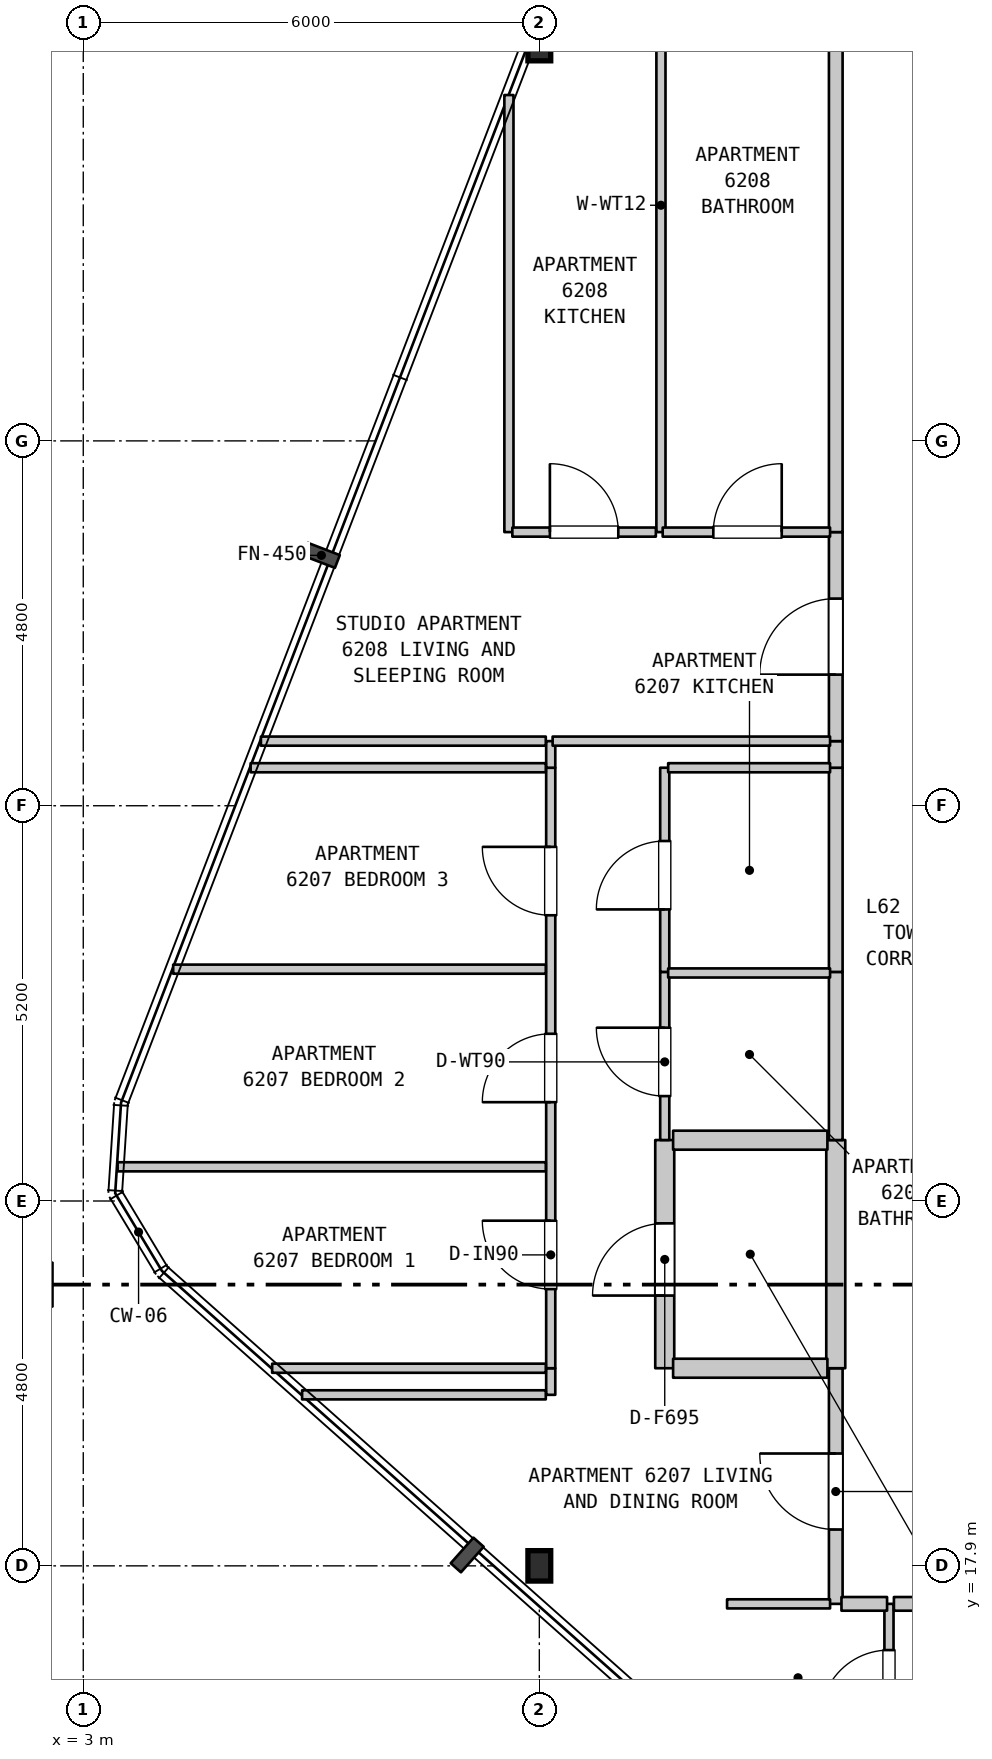
"""IFC4 building model, lengths in metres.
Left out: names, types, materials, properties, quantities, classifications, styles, units other than length and angle.
Written with IfcOpenShell. Run it as: python <this file> out.ifc"""

import sys

from ifc_helpers import new_model, si_unit, direction, frame, frame_2d, origin, origin_2d, place, context, subcontext, project, spatial, rectangle, i_section, extrude, element, fill, save


model = new_model("IFC4")
c1 = context("Model", 3, precision=1e-05, world=origin(), true_north=direction((0.0, 1.0)))
c2 = subcontext(c1, "Body", "Model", "MODEL_VIEW")
j1 = project(units=[si_unit("LENGTHUNIT", "METRE"), si_unit("PLANEANGLEUNIT", "RADIAN")], contexts=[c1])
p1 = place(None, origin())
s1 = spatial("IfcSite", under=j1, at=p1, CompositionType="ELEMENT")
p2 = place(p1, origin())
s2 = spatial("IfcBuilding", under=s1, at=p2, CompositionType="ELEMENT")
p3 = place(p2, frame((0.0, 0.0, 251.0)))
s3 = spatial("IfcBuildingStorey", under=s2, at=p3, CompositionType="ELEMENT", Elevation=251.0)
for number, where, z_axis, x_axis in (
    (1, (9.0, 17.9, 0.0), (0.0, 0.0, 1.0), (1.0, 0.0, 0.0)),
    (2, (9.0, 37.9, 0.0), (0.0, 0.0, 1.0), (1.0, 0.0, 0.0)),
):
    element("IfcColumn", number, at=place(p3, frame(where, z_axis=z_axis, x_axis=x_axis)), inside=s3, PredefinedType="COLUMN", context=c2, shape_type="SweptSolid", body=[
        extrude(i_section(OverallWidth=0.3, OverallDepth=0.4, WebThickness=0.013, FlangeThickness=0.024, FilletRadius=0.027, at=origin_2d()), origin(), (0.0, 0.0, 1.0), 3.7),
    ])
p4 = place(p3, frame((8.6, 31.5, 0.0), z_axis=(0.0, 0.0, 1.0), x_axis=(0.0, 1.0, 0.0)))
e3 = element("IfcWall", 3, at=p4, inside=s3, PredefinedType="PARTITIONING", context=c2, shape_type="SweptSolid", body=[
    extrude(rectangle(XDim=5.75, YDim=0.12, at=frame_2d((2.875, 0.0))), origin(), (0.0, 0.0, 1.0), 3.39),
])
p5 = place(p3, frame((9.15, 20.15, 0.0), z_axis=(0.0, 0.0, 1.0), x_axis=(0.0, 1.0, 0.0)))
e4 = element("IfcWall", 4, at=p5, inside=s3, PredefinedType="PARTITIONING", context=c2, shape_type="SweptSolid", body=[
    extrude(rectangle(XDim=0.35, YDim=0.12, at=frame_2d((0.175, 0.0))), origin(), (0.0, 0.0, 1.0), 3.39),
])
p6 = place(p3, frame((9.15, 20.5, 0.0), z_axis=(0.0, 0.0, 1.0), x_axis=(0.0, 1.0, 0.0)))
e5 = element("IfcWall", 5, at=p6, inside=s3, PredefinedType="PARTITIONING", context=c2, shape_type="SweptSolid", body=[
    extrude(rectangle(XDim=7.9, YDim=0.12, at=frame_2d((3.95, 0.0))), origin(), (0.0, 0.0, 1.0), 2.79),
])
p7 = place(p6, frame((1.041, 0.0, 0.0)))
e6 = element("IfcOpeningElement", 6, at=p7, cuts=e5, PredefinedType="OPENING", context=c2, shape_type="SweptSolid", body=[
    extrude(rectangle(XDim=0.9, YDim=2.15, at=frame_2d((0.45, 1.075))), frame((0.0, 0.07, 0.0), z_axis=(0.0, -1.0, 0.0), x_axis=(1.0, 0.0, 0.0)), (0.0, 0.0, 1.0), 0.14),
])
p8 = place(p6, frame((3.5, 0.0, 0.0)))
e7 = element("IfcOpeningElement", 7, at=p8, cuts=e5, PredefinedType="OPENING", context=c2, shape_type="SweptSolid", body=[
    extrude(rectangle(XDim=0.9, YDim=2.15, at=frame_2d((0.45, 1.075))), frame((0.0, 0.07, 0.0), z_axis=(0.0, -1.0, 0.0), x_axis=(1.0, 0.0, 0.0)), (0.0, 0.0, 1.0), 0.14),
])
p9 = place(p6, frame((5.959, 0.0, 0.0)))
e8 = element("IfcOpeningElement", 8, at=p9, cuts=e5, PredefinedType="OPENING", context=c2, shape_type="SweptSolid", body=[
    extrude(rectangle(XDim=0.9, YDim=2.15, at=frame_2d((0.45, 1.075))), frame((0.0, 0.07, 0.0), z_axis=(0.0, -1.0, 0.0), x_axis=(1.0, 0.0, 0.0)), (0.0, 0.0, 1.0), 0.14),
])
p10 = place(p3, frame((9.15, 28.4, 0.0), z_axis=(0.0, 0.0, 1.0), x_axis=(0.0, 1.0, 0.0)))
e9 = element("IfcWall", 9, at=p10, inside=s3, PredefinedType="PARTITIONING", context=c2, shape_type="SweptSolid", body=[
    extrude(rectangle(XDim=0.35, YDim=0.12, at=frame_2d((0.175, 0.0))), origin(), (0.0, 0.0, 1.0), 3.39),
])
p11 = place(p3, frame((10.6, 31.5, 0.0), z_axis=(0.0, 0.0, 1.0), x_axis=(0.0, 1.0, 0.0)))
e10 = element("IfcWall", 10, at=p11, inside=s3, PredefinedType="PARTITIONING", context=c2, shape_type="SweptSolid", body=[
    extrude(rectangle(XDim=8.6, YDim=0.12, at=frame_2d((4.3, 0.0))), origin(), (0.0, 0.0, 1.0), 3.39),
])
p12 = place(p3, frame((10.65, 20.5, 0.0), z_axis=(0.0, 0.0, 1.0), x_axis=(0.0, 1.0, 0.0)))
e11 = element("IfcWall", 11, at=p12, inside=s3, PredefinedType="STANDARD", context=c2, shape_type="SweptSolid", body=[
    extrude(rectangle(XDim=3.002, YDim=0.25, at=frame_2d((1.501, 0.0))), origin(), (0.0, 0.0, 1.0), 3.39),
])
p13 = place(p12, frame((0.956, 0.0, 0.0)))
e12 = element("IfcOpeningElement", 12, at=p13, cuts=e11, PredefinedType="OPENING", context=c2, shape_type="SweptSolid", body=[
    extrude(rectangle(XDim=0.95, YDim=2.15, at=frame_2d((0.475, 1.075))), frame((0.0, 0.135, 0.0), z_axis=(0.0, -1.0, 0.0), x_axis=(1.0, 0.0, 0.0)), (0.0, 0.0, 1.0), 0.27),
])
p14 = place(p3, frame((10.65, 23.502, 0.0), z_axis=(0.0, 0.0, 1.0), x_axis=(0.0, 1.0, 0.0)))
e13 = element("IfcWall", 13, at=p14, inside=s3, PredefinedType="PARTITIONING", context=c2, shape_type="SweptSolid", body=[
    extrude(rectangle(XDim=2.212, YDim=0.12, at=frame_2d((1.106, 0.0))), origin(), (0.0, 0.0, 1.0), 3.39),
])
p15 = place(p14, frame((0.578, 0.0, 0.0)))
e14 = element("IfcOpeningElement", 14, at=p15, cuts=e13, PredefinedType="OPENING", context=c2, shape_type="SweptSolid", body=[
    extrude(rectangle(XDim=0.9, YDim=2.1, at=frame_2d((0.45, 1.05))), frame((0.0, 0.07, 0.0), z_axis=(0.0, -1.0, 0.0), x_axis=(1.0, 0.0, 0.0)), (0.0, 0.0, 1.0), 0.14),
])
p16 = place(p3, frame((10.65, 25.714, 0.0), z_axis=(0.0, 0.0, 1.0), x_axis=(0.0, 1.0, 0.0)))
e15 = element("IfcWall", 15, at=p16, inside=s3, PredefinedType="PARTITIONING", context=c2, shape_type="SweptSolid", body=[
    extrude(rectangle(XDim=2.686, YDim=0.12, at=frame_2d((1.343, 0.0))), origin(), (0.0, 0.0, 1.0), 3.39),
])
p17 = place(p16, frame((0.822, 0.0, 0.0)))
e16 = element("IfcOpeningElement", 16, at=p17, cuts=e15, PredefinedType="OPENING", context=c2, shape_type="SweptSolid", body=[
    extrude(rectangle(XDim=0.9, YDim=2.15, at=frame_2d((0.45, 1.075))), frame((0.0, 0.07, 0.0), z_axis=(0.0, -1.0, 0.0), x_axis=(1.0, 0.0, 0.0)), (0.0, 0.0, 1.0), 0.14),
])
p18 = place(p3, frame((12.9, 17.4, 0.0), z_axis=(0.0, 0.0, 1.0), x_axis=(0.0, 1.0, 0.0)))
e17 = element("IfcWall", 17, at=p18, inside=s3, PredefinedType="STANDARD", context=c2, shape_type="SweptSolid", body=[
    extrude(rectangle(XDim=3.1, YDim=0.18, at=frame_2d((1.55, 0.0))), origin(), (0.0, 0.0, 1.0), 3.39),
])
p19 = place(p18, frame((0.978, 0.0, 0.0)))
e18 = element("IfcOpeningElement", 18, at=p19, cuts=e17, PredefinedType="OPENING", context=c2, shape_type="SweptSolid", body=[
    extrude(rectangle(XDim=1.0, YDim=2.15, at=frame_2d((0.5, 1.075))), frame((0.0, 0.1, 0.0), z_axis=(0.0, -1.0, 0.0), x_axis=(1.0, 0.0, 0.0)), (0.0, 0.0, 1.0), 0.2),
])
p20 = place(p3, frame((12.9, 20.5, 0.0), z_axis=(0.0, 0.0, 1.0), x_axis=(0.0, 1.0, 0.0)))
e19 = element("IfcWall", 19, at=p20, inside=s3, PredefinedType="STANDARD", context=c2, shape_type="SweptSolid", body=[
    extrude(rectangle(XDim=3.002, YDim=0.25, at=frame_2d((1.501, 0.0))), origin(), (0.0, 0.0, 1.0), 3.39),
])
p21 = place(p3, frame((12.9, 23.502, 0.0), z_axis=(0.0, 0.0, 1.0), x_axis=(0.0, 1.0, 0.0)))
e20 = element("IfcWall", 20, at=p21, inside=s3, PredefinedType="STANDARD", context=c2, shape_type="SweptSolid", body=[
    extrude(rectangle(XDim=2.212, YDim=0.18, at=frame_2d((1.106, 0.0))), origin(), (0.0, 0.0, 1.0), 3.39),
])
p22 = place(p3, frame((12.9, 25.714, 0.0), z_axis=(0.0, 0.0, 1.0), x_axis=(0.0, 1.0, 0.0)))
e21 = element("IfcWall", 21, at=p22, inside=s3, PredefinedType="STANDARD", context=c2, shape_type="SweptSolid", body=[
    extrude(rectangle(XDim=2.686, YDim=0.18, at=frame_2d((1.343, 0.0))), origin(), (0.0, 0.0, 1.0), 3.39),
])
p23 = place(p3, frame((12.9, 28.4, 0.0), z_axis=(0.0, 0.0, 1.0), x_axis=(0.0, 1.0, 0.0)))
e22 = element("IfcWall", 22, at=p23, inside=s3, PredefinedType="STANDARD", context=c2, shape_type="SweptSolid", body=[
    extrude(rectangle(XDim=0.35, YDim=0.18, at=frame_2d((0.175, 0.0))), origin(), (0.0, 0.0, 1.0), 3.39),
])
p24 = place(p3, frame((12.9, 28.75, 0.0), z_axis=(0.0, 0.0, 1.0), x_axis=(0.0, 1.0, 0.0)))
e23 = element("IfcWall", 23, at=p24, inside=s3, PredefinedType="STANDARD", context=c2, shape_type="SweptSolid", body=[
    extrude(rectangle(XDim=2.75, YDim=0.18, at=frame_2d((1.375, 0.0))), origin(), (0.0, 0.0, 1.0), 3.39),
])
p25 = place(p24, frame((0.875, 0.0, 0.0)))
e24 = element("IfcOpeningElement", 24, at=p25, cuts=e23, PredefinedType="OPENING", context=c2, shape_type="SweptSolid", body=[
    extrude(rectangle(XDim=1.0, YDim=2.15, at=frame_2d((0.5, 1.075))), frame((0.0, 0.1, 0.0), z_axis=(0.0, -1.0, 0.0), x_axis=(1.0, 0.0, 0.0)), (0.0, 0.0, 1.0), 0.2),
])
p26 = place(p3, frame((12.9, 31.5, 0.0), z_axis=(0.0, 0.0, 1.0), x_axis=(0.0, 1.0, 0.0)))
e25 = element("IfcWall", 25, at=p26, inside=s3, PredefinedType="STANDARD", context=c2, shape_type="SweptSolid", body=[
    extrude(rectangle(XDim=8.6, YDim=0.18, at=frame_2d((4.3, 0.0))), origin(), (0.0, 0.0, 1.0), 3.39),
])
p27 = place(p3, frame((13.6, 15.45, 0.0), z_axis=(0.0, 0.0, 1.0), x_axis=(0.0, 1.0, 0.0)))
e26 = element("IfcWall", 26, at=p27, inside=s3, PredefinedType="PARTITIONING", context=c2, shape_type="SweptSolid", body=[
    extrude(rectangle(XDim=1.95, YDim=0.12, at=frame_2d((0.975, 0.0))), origin(), (0.0, 0.0, 1.0), 3.39),
])
p28 = place(p27, frame((0.442, 0.0, 0.0)))
e27 = element("IfcOpeningElement", 27, at=p28, cuts=e26, PredefinedType="OPENING", context=c2, shape_type="SweptSolid", body=[
    extrude(rectangle(XDim=0.9, YDim=2.15, at=frame_2d((0.45, 1.075))), frame((0.0, 0.07, 0.0), z_axis=(0.0, -1.0, 0.0), x_axis=(1.0, 0.0, 0.0)), (0.0, 0.0, 1.0), 0.14),
])
p29 = place(p3, frame((11.47, 17.4, 0.0), z_axis=(0.0, 0.0, 1.0), x_axis=(1.0, 0.0, 0.0)))
e28 = element("IfcWall", 28, at=p29, inside=s3, PredefinedType="PARTITIONING", context=c2, shape_type="SweptSolid", body=[
    extrude(rectangle(XDim=1.355, YDim=0.12, at=frame_2d((0.677, 0.0))), origin(), (0.0, 0.0, 1.0), 3.39),
])
p30 = place(p3, frame((12.975, 17.4, 0.0), z_axis=(0.0, 0.0, 1.0), x_axis=(1.0, 0.0, 0.0)))
e29 = element("IfcWall", 29, at=p30, inside=s3, PredefinedType="STANDARD", context=c2, shape_type="SweptSolid", body=[
    extrude(rectangle(XDim=0.6, YDim=0.18, at=frame_2d((0.3, 0.0))), origin(), (0.0, 0.0, 1.0), 3.39),
])
p31 = place(p3, frame((13.665, 17.4, 0.0), z_axis=(0.0, 0.0, 1.0), x_axis=(1.0, 0.0, 0.0)))
e30 = element("IfcWall", 30, at=p31, inside=s3, PredefinedType="STANDARD", context=c2, shape_type="SweptSolid", body=[
    extrude(rectangle(XDim=3.69, YDim=0.18, at=frame_2d((1.845, 0.0))), origin(), (0.0, 0.0, 1.0), 3.39),
])
p32 = place(p31, frame((2.01, 0.0, 0.0)))
e31 = element("IfcOpeningElement", 31, at=p32, cuts=e30, PredefinedType="OPENING", context=c2, shape_type="SweptSolid", body=[
    extrude(rectangle(XDim=1.0, YDim=2.15, at=frame_2d((0.5, 1.075))), frame((0.0, 0.1, 0.0), z_axis=(0.0, -1.0, 0.0), x_axis=(1.0, 0.0, 0.0)), (0.0, 0.0, 1.0), 0.2),
])
p33 = place(p3, frame((5.879, 20.15, 0.0), z_axis=(0.0, 0.0, 1.0), x_axis=(1.0, 0.0, 0.0)))
e32 = element("IfcWall", 32, at=p33, inside=s3, PredefinedType="PARTITIONING", context=c2, shape_type="SweptSolid", body=[
    extrude(rectangle(XDim=3.206, YDim=0.12, at=frame_2d((1.603, 0.0))), origin(), (0.0, 0.0, 1.0), 3.39),
])
p34 = place(p3, frame((5.485, 20.5, 0.0), z_axis=(0.0, 0.0, 1.0), x_axis=(1.0, 0.0, 0.0)))
e33 = element("IfcWall", 33, at=p34, inside=s3, PredefinedType="PARTITIONING", context=c2, shape_type="SweptSolid", body=[
    extrude(rectangle(XDim=3.6, YDim=0.12, at=frame_2d((1.8, 0.0))), origin(), (0.0, 0.0, 1.0), 3.39),
])
p35 = place(p3, frame((10.76, 20.5, 0.0), z_axis=(0.0, 0.0, 1.0), x_axis=(1.0, 0.0, 0.0)))
e34 = element("IfcWall", 34, at=p35, inside=s3, PredefinedType="STANDARD", context=c2, shape_type="SweptSolid", body=[
    extrude(rectangle(XDim=2.03, YDim=0.25, at=frame_2d((1.015, 0.0))), origin(), (0.0, 0.0, 1.0), 3.39),
])
p36 = place(p3, frame((3.452, 23.15, 0.0), z_axis=(0.0, 0.0, 1.0), x_axis=(1.0, 0.0, 0.0)))
e35 = element("IfcWall", 35, at=p36, inside=s3, PredefinedType="PARTITIONING", context=c2, shape_type="SweptSolid", body=[
    extrude(rectangle(XDim=5.633, YDim=0.12, at=frame_2d((2.816, 0.0))), origin(), (0.0, 0.0, 1.0), 3.39),
])
p37 = place(p3, frame((10.76, 23.5, 0.0), z_axis=(0.0, 0.0, 1.0), x_axis=(1.0, 0.0, 0.0)))
e36 = element("IfcWall", 36, at=p37, inside=s3, PredefinedType="STANDARD", context=c2, shape_type="SweptSolid", body=[
    extrude(rectangle(XDim=2.03, YDim=0.25, at=frame_2d((1.015, 0.0))), origin(), (0.0, 0.0, 1.0), 3.39),
])
p38 = place(p3, frame((10.695, 25.7, 0.0), z_axis=(0.0, 0.0, 1.0), x_axis=(1.0, 0.0, 0.0)))
e37 = element("IfcWall", 37, at=p38, inside=s3, PredefinedType="PARTITIONING", context=c2, shape_type="SweptSolid", body=[
    extrude(rectangle(XDim=2.13, YDim=0.12, at=frame_2d((1.065, 0.0))), origin(), (0.0, 0.0, 1.0), 3.39),
])
p39 = place(p3, frame((4.183, 25.75, 0.0), z_axis=(0.0, 0.0, 1.0), x_axis=(1.0, 0.0, 0.0)))
e38 = element("IfcWall", 38, at=p39, inside=s3, PredefinedType="PARTITIONING", context=c2, shape_type="SweptSolid", body=[
    extrude(rectangle(XDim=4.902, YDim=0.12, at=frame_2d((2.451, 0.0))), origin(), (0.0, 0.0, 1.0), 3.39),
])
p40 = place(p3, frame((5.202, 28.4, 0.0), z_axis=(0.0, 0.0, 1.0), x_axis=(1.0, 0.0, 0.0)))
e39 = element("IfcWall", 39, at=p40, inside=s3, PredefinedType="PARTITIONING", context=c2, shape_type="SweptSolid", body=[
    extrude(rectangle(XDim=3.883, YDim=0.12, at=frame_2d((1.941, 0.0))), origin(), (0.0, 0.0, 1.0), 3.39),
])
p41 = place(p3, frame((10.695, 28.4, 0.0), z_axis=(0.0, 0.0, 1.0), x_axis=(1.0, 0.0, 0.0)))
e40 = element("IfcWall", 40, at=p41, inside=s3, PredefinedType="PARTITIONING", context=c2, shape_type="SweptSolid", body=[
    extrude(rectangle(XDim=2.13, YDim=0.12, at=frame_2d((1.065, 0.0))), origin(), (0.0, 0.0, 1.0), 3.39),
])
p42 = place(p3, frame((5.337, 28.75, 0.0), z_axis=(0.0, 0.0, 1.0), x_axis=(1.0, 0.0, 0.0)))
e41 = element("IfcWall", 41, at=p42, inside=s3, PredefinedType="PARTITIONING", context=c2, shape_type="SweptSolid", body=[
    extrude(rectangle(XDim=3.748, YDim=0.12, at=frame_2d((1.874, 0.0))), origin(), (0.0, 0.0, 1.0), 3.39),
])
p43 = place(p3, frame((9.175, 28.75, 0.0), z_axis=(0.0, 0.0, 1.0), x_axis=(1.0, 0.0, 0.0)))
e42 = element("IfcWall", 42, at=p43, inside=s3, PredefinedType="PARTITIONING", context=c2, shape_type="SweptSolid", body=[
    extrude(rectangle(XDim=3.65, YDim=0.12, at=frame_2d((1.825, 0.0))), origin(), (0.0, 0.0, 1.0), 3.39),
])
p44 = place(p3, frame((8.645, 31.5, 0.0), z_axis=(0.0, 0.0, 1.0), x_axis=(1.0, 0.0, 0.0)))
e43 = element("IfcWall", 43, at=p44, inside=s3, PredefinedType="PARTITIONING", context=c2, shape_type="SweptSolid", body=[
    extrude(rectangle(XDim=1.888, YDim=0.12, at=frame_2d((0.944, 0.0))), origin(), (0.0, 0.0, 1.0), 3.39),
])
p45 = place(p44, frame((0.494, 0.0, 0.0)))
e44 = element("IfcOpeningElement", 44, at=p45, cuts=e43, PredefinedType="OPENING", context=c2, shape_type="SweptSolid", body=[
    extrude(rectangle(XDim=0.9, YDim=2.15, at=frame_2d((0.45, 1.075))), frame((0.0, 0.07, 0.0), z_axis=(0.0, -1.0, 0.0), x_axis=(1.0, 0.0, 0.0)), (0.0, 0.0, 1.0), 0.14),
])
p46 = place(p3, frame((10.623, 31.5, 0.0), z_axis=(0.0, 0.0, 1.0), x_axis=(1.0, 0.0, 0.0)))
e45 = element("IfcWall", 45, at=p46, inside=s3, PredefinedType="PARTITIONING", context=c2, shape_type="SweptSolid", body=[
    extrude(rectangle(XDim=2.202, YDim=0.12, at=frame_2d((1.101, 0.0))), origin(), (0.0, 0.0, 1.0), 3.39),
])
p47 = place(p46, frame((0.666, 0.0, 0.0)))
e46 = element("IfcOpeningElement", 46, at=p47, cuts=e45, PredefinedType="OPENING", context=c2, shape_type="SweptSolid", body=[
    extrude(rectangle(XDim=0.9, YDim=2.1, at=frame_2d((0.45, 1.05))), frame((0.0, 0.07, 0.0), z_axis=(0.0, -1.0, 0.0), x_axis=(1.0, 0.0, 0.0)), (0.0, 0.0, 1.0), 0.14),
])
p48 = place(p7, origin())
e47 = element("IfcDoor", 47, at=p48, inside=s3, OperationType="SINGLE_SWING_RIGHT", PredefinedType="DOOR", context=c2, shape_type="SweptSolid", body=[
    extrude(rectangle(XDim=0.9, YDim=2.15, at=frame_2d((0.45, 1.075))), frame((0.0, 0.025, 0.0), z_axis=(0.0, -1.0, 0.0), x_axis=(1.0, 0.0, 0.0)), (0.0, 0.0, 1.0), 0.05),
])
fill(e6, e47)
p49 = place(p8, origin())
e48 = element("IfcDoor", 48, at=p49, inside=s3, OperationType="SINGLE_SWING_LEFT", PredefinedType="DOOR", context=c2, shape_type="SweptSolid", body=[
    extrude(rectangle(XDim=0.9, YDim=2.15, at=frame_2d((0.45, 1.075))), frame((0.0, 0.025, 0.0), z_axis=(0.0, -1.0, 0.0), x_axis=(1.0, 0.0, 0.0)), (0.0, 0.0, 1.0), 0.05),
])
fill(e7, e48)
p50 = place(p9, origin())
e49 = element("IfcDoor", 49, at=p50, inside=s3, OperationType="SINGLE_SWING_RIGHT", PredefinedType="DOOR", context=c2, shape_type="SweptSolid", body=[
    extrude(rectangle(XDim=0.9, YDim=2.15, at=frame_2d((0.45, 1.075))), frame((0.0, 0.025, 0.0), z_axis=(0.0, -1.0, 0.0), x_axis=(1.0, 0.0, 0.0)), (0.0, 0.0, 1.0), 0.05),
])
fill(e8, e49)
p51 = place(p13, origin())
e50 = element("IfcDoor", 50, at=p51, inside=s3, OperationType="SINGLE_SWING_LEFT", PredefinedType="DOOR", context=c2, shape_type="SweptSolid", body=[
    extrude(rectangle(XDim=0.95, YDim=2.15, at=frame_2d((0.475, 1.075))), frame((0.0, 0.025, 0.0), z_axis=(0.0, -1.0, 0.0), x_axis=(1.0, 0.0, 0.0)), (0.0, 0.0, 1.0), 0.05),
])
fill(e12, e50)
p52 = place(p15, origin())
e51 = element("IfcDoor", 51, at=p52, inside=s3, OperationType="SINGLE_SWING_RIGHT", PredefinedType="DOOR", context=c2, shape_type="SweptSolid", body=[
    extrude(rectangle(XDim=0.9, YDim=2.1, at=frame_2d((0.45, 1.05))), frame((0.0, 0.025, 0.0), z_axis=(0.0, -1.0, 0.0), x_axis=(1.0, 0.0, 0.0)), (0.0, 0.0, 1.0), 0.05),
])
fill(e14, e51)
p53 = place(p17, origin())
e52 = element("IfcDoor", 52, at=p53, inside=s3, OperationType="SINGLE_SWING_LEFT", PredefinedType="DOOR", context=c2, shape_type="SweptSolid", body=[
    extrude(rectangle(XDim=0.9, YDim=2.15, at=frame_2d((0.45, 1.075))), frame((0.0, 0.025, 0.0), z_axis=(0.0, -1.0, 0.0), x_axis=(1.0, 0.0, 0.0)), (0.0, 0.0, 1.0), 0.05),
])
fill(e16, e52)
p54 = place(p19, origin())
e53 = element("IfcDoor", 53, at=p54, inside=s3, OperationType="SINGLE_SWING_RIGHT", PredefinedType="DOOR", context=c2, shape_type="SweptSolid", body=[
    extrude(rectangle(XDim=1.0, YDim=2.15, at=frame_2d((0.5, 1.075))), frame((0.0, 0.025, 0.0), z_axis=(0.0, -1.0, 0.0), x_axis=(1.0, 0.0, 0.0)), (0.0, 0.0, 1.0), 0.05),
])
fill(e18, e53)
p55 = place(p25, origin())
e54 = element("IfcDoor", 54, at=p55, inside=s3, OperationType="SINGLE_SWING_LEFT", PredefinedType="DOOR", context=c2, shape_type="SweptSolid", body=[
    extrude(rectangle(XDim=1.0, YDim=2.15, at=frame_2d((0.5, 1.075))), frame((0.0, 0.025, 0.0), z_axis=(0.0, -1.0, 0.0), x_axis=(1.0, 0.0, 0.0)), (0.0, 0.0, 1.0), 0.05),
])
fill(e24, e54)
p56 = place(p28, origin())
e55 = element("IfcDoor", 55, at=p56, inside=s3, OperationType="SINGLE_SWING_LEFT", PredefinedType="DOOR", context=c2, shape_type="SweptSolid", body=[
    extrude(rectangle(XDim=0.9, YDim=2.15, at=frame_2d((0.45, 1.075))), frame((0.0, 0.025, 0.0), z_axis=(0.0, -1.0, 0.0), x_axis=(1.0, 0.0, 0.0)), (0.0, 0.0, 1.0), 0.05),
])
fill(e27, e55)
p57 = place(p45, origin())
e56 = element("IfcDoor", 56, at=p57, inside=s3, OperationType="SINGLE_SWING_LEFT", PredefinedType="DOOR", context=c2, shape_type="SweptSolid", body=[
    extrude(rectangle(XDim=0.9, YDim=2.15, at=frame_2d((0.45, 1.075))), frame((0.0, 0.025, 0.0), z_axis=(0.0, -1.0, 0.0), x_axis=(1.0, 0.0, 0.0)), (0.0, 0.0, 1.0), 0.05),
])
fill(e44, e56)
p58 = place(p47, origin())
e57 = element("IfcDoor", 57, at=p58, inside=s3, OperationType="SINGLE_SWING_RIGHT", PredefinedType="DOOR", context=c2, shape_type="SweptSolid", body=[
    extrude(rectangle(XDim=0.9, YDim=2.1, at=frame_2d((0.45, 1.05))), frame((0.0, 0.025, 0.0), z_axis=(0.0, -1.0, 0.0), x_axis=(1.0, 0.0, 0.0)), (0.0, 0.0, 1.0), 0.05),
])
fill(e46, e57)
save(model, sys.argv[1])
